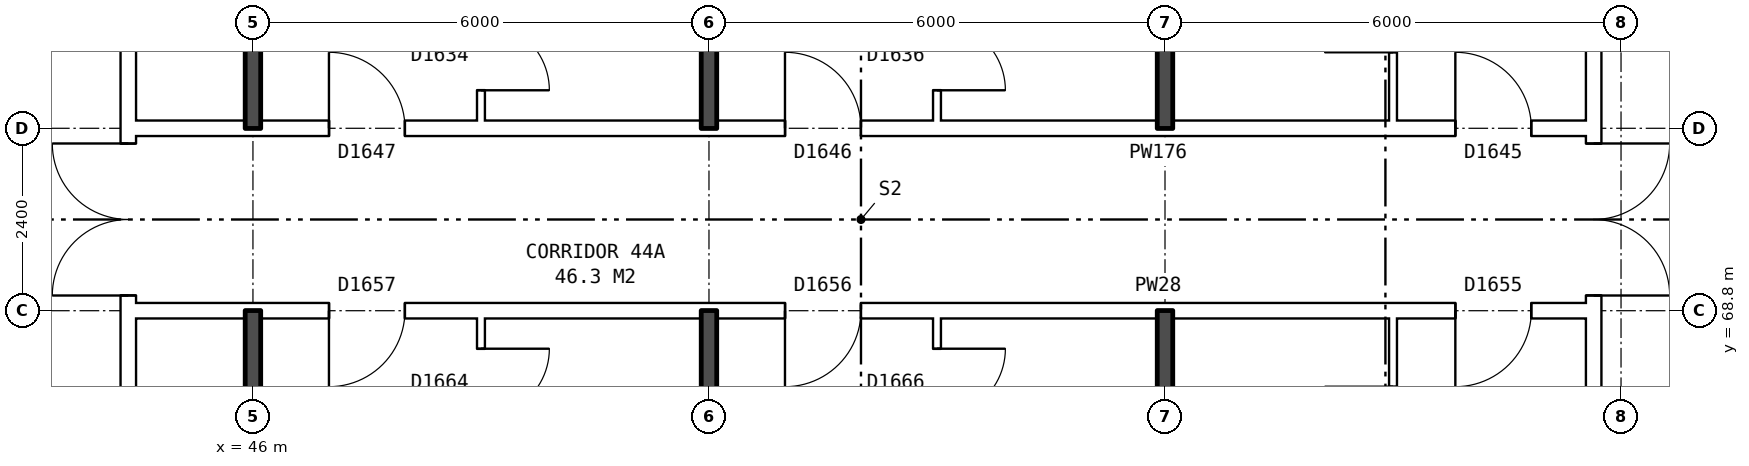
"""IFC4 building model, lengths in metres.
Left out: names, types, materials, properties, quantities, classifications, styles, units other than length and angle.
Written with IfcOpenShell. Run it as: python <this file> out.ifc"""

import sys

from ifc_helpers import new_model, si_unit, direction, frame, frame_2d, origin, place, context, subcontext, project, spatial, rectangle, extrude, element, fill, save


model = new_model("IFC4")
c1 = context("Model", 3, precision=1e-05, world=origin(), true_north=direction((0.0, 1.0)))
c2 = subcontext(c1, "Body", "Model", "MODEL_VIEW")
j1 = project(units=[si_unit("LENGTHUNIT", "METRE"), si_unit("PLANEANGLEUNIT", "RADIAN")], contexts=[c1])
p1 = place(None, origin())
s1 = spatial("IfcSite", under=j1, at=p1, CompositionType="ELEMENT")
p2 = place(p1, origin())
s2 = spatial("IfcBuilding", under=s1, at=p2, CompositionType="ELEMENT")
p3 = place(p2, frame((0.0, 0.0, 157.8)))
s3 = spatial("IfcBuildingStorey", under=s2, at=p3, CompositionType="ELEMENT", Elevation=157.8)
p4 = place(p3, frame((63.64, 63.9, 0.0), z_axis=(0.0, 0.0, 1.0), x_axis=(0.0, 1.0, 0.0)))
e1 = element("IfcWall", 1, at=p4, inside=s3, PredefinedType="PARTITIONING", context=c2, shape_type="SweptSolid", body=[
    extrude(rectangle(XDim=12.2, YDim=0.2, at=frame_2d((6.1, 0.0))), origin(), (0.0, 0.0, 1.0), 2.85),
])
p5 = place(p4, frame((5.1, 0.0, 0.0)))
e2 = element("IfcOpeningElement", 2, at=p5, cuts=e1, PredefinedType="OPENING", context=c2, shape_type="SweptSolid", body=[
    extrude(rectangle(XDim=2.0, YDim=2.1, at=frame_2d((1.0, 1.05))), frame((0.0, 0.11, 0.0), z_axis=(0.0, -1.0, 0.0), x_axis=(1.0, 0.0, 0.0)), (0.0, 0.0, 1.0), 0.22),
])
p6 = place(p3, frame((44.36, 63.9, 0.0), z_axis=(0.0, 0.0, 1.0), x_axis=(0.0, 1.0, 0.0)))
e3 = element("IfcWall", 3, at=p6, inside=s3, PredefinedType="PARTITIONING", context=c2, shape_type="SweptSolid", body=[
    extrude(rectangle(XDim=12.2, YDim=0.2, at=frame_2d((6.1, 0.0))), origin(), (0.0, 0.0, 1.0), 2.85),
])
p7 = place(p6, frame((5.1, 0.0, 0.0)))
e4 = element("IfcOpeningElement", 4, at=p7, cuts=e3, PredefinedType="OPENING", context=c2, shape_type="SweptSolid", body=[
    extrude(rectangle(XDim=2.0, YDim=2.1, at=frame_2d((1.0, 1.05))), frame((0.0, 0.11, 0.0), z_axis=(0.0, -1.0, 0.0), x_axis=(1.0, 0.0, 0.0)), (0.0, 0.0, 1.0), 0.22),
])
p8 = place(p3, frame((44.36, 68.8, 0.0), z_axis=(0.0, 0.0, 1.0), x_axis=(1.0, 0.0, 0.0)))
e5 = element("IfcWall", 5, at=p8, inside=s3, PredefinedType="PARTITIONING", context=c2, shape_type="SweptSolid", body=[
    extrude(rectangle(XDim=19.28, YDim=0.2, at=frame_2d((9.64, 0.0))), origin(), (0.0, 0.0, 1.0), 2.85),
])
p9 = place(p8, frame((17.46, 0.0, 0.0)))
e6 = element("IfcOpeningElement", 6, at=p9, cuts=e5, PredefinedType="OPENING", context=c2, shape_type="SweptSolid", body=[
    extrude(rectangle(XDim=1.0, YDim=2.1, at=frame_2d((0.5, 1.05))), frame((0.0, 0.11, 0.0), z_axis=(0.0, -1.0, 0.0), x_axis=(1.0, 0.0, 0.0)), (0.0, 0.0, 1.0), 0.22),
])
p10 = place(p8, frame((8.64, 0.0, 0.0)))
e7 = element("IfcOpeningElement", 7, at=p10, cuts=e5, PredefinedType="OPENING", context=c2, shape_type="SweptSolid", body=[
    extrude(rectangle(XDim=1.0, YDim=2.1, at=frame_2d((0.5, 1.05))), frame((0.0, 0.11, 0.0), z_axis=(0.0, -1.0, 0.0), x_axis=(1.0, 0.0, 0.0)), (0.0, 0.0, 1.0), 0.22),
])
p11 = place(p8, frame((2.64, 0.0, 0.0)))
e8 = element("IfcOpeningElement", 8, at=p11, cuts=e5, PredefinedType="OPENING", context=c2, shape_type="SweptSolid", body=[
    extrude(rectangle(XDim=1.0, YDim=2.1, at=frame_2d((0.5, 1.05))), frame((0.0, 0.11, 0.0), z_axis=(0.0, -1.0, 0.0), x_axis=(1.0, 0.0, 0.0)), (0.0, 0.0, 1.0), 0.22),
])
p12 = place(p3, frame((44.36, 71.2, 0.0), z_axis=(0.0, 0.0, 1.0), x_axis=(1.0, 0.0, 0.0)))
e9 = element("IfcWall", 9, at=p12, inside=s3, PredefinedType="PARTITIONING", context=c2, shape_type="SweptSolid", body=[
    extrude(rectangle(XDim=19.28, YDim=0.2, at=frame_2d((9.64, 0.0))), origin(), (0.0, 0.0, 1.0), 2.85),
])
p13 = place(p12, frame((17.46, 0.0, 0.0)))
e10 = element("IfcOpeningElement", 10, at=p13, cuts=e9, PredefinedType="OPENING", context=c2, shape_type="SweptSolid", body=[
    extrude(rectangle(XDim=1.0, YDim=2.1, at=frame_2d((0.5, 1.05))), frame((0.0, 0.11, 0.0), z_axis=(0.0, -1.0, 0.0), x_axis=(1.0, 0.0, 0.0)), (0.0, 0.0, 1.0), 0.22),
])
p14 = place(p12, frame((8.64, 0.0, 0.0)))
e11 = element("IfcOpeningElement", 11, at=p14, cuts=e9, PredefinedType="OPENING", context=c2, shape_type="SweptSolid", body=[
    extrude(rectangle(XDim=1.0, YDim=2.1, at=frame_2d((0.5, 1.05))), frame((0.0, 0.11, 0.0), z_axis=(0.0, -1.0, 0.0), x_axis=(1.0, 0.0, 0.0)), (0.0, 0.0, 1.0), 0.22),
])
p15 = place(p12, frame((2.64, 0.0, 0.0)))
e12 = element("IfcOpeningElement", 12, at=p15, cuts=e9, PredefinedType="OPENING", context=c2, shape_type="SweptSolid", body=[
    extrude(rectangle(XDim=1.0, YDim=2.1, at=frame_2d((0.5, 1.05))), frame((0.0, 0.11, 0.0), z_axis=(0.0, -1.0, 0.0), x_axis=(1.0, 0.0, 0.0)), (0.0, 0.0, 1.0), 0.22),
])
for number, where, z_axis, x_axis in (
    (13, (46.0, 63.8, 0.0), (0.0, 0.0, 1.0), (0.0, 1.0, 0.0)),
    (14, (46.0, 71.2, 0.0), (0.0, 0.0, 1.0), (0.0, 1.0, 0.0)),
):
    element("IfcWall", number, at=place(p3, frame(where, z_axis=z_axis, x_axis=x_axis)), inside=s3, PredefinedType="SOLIDWALL", context=c2, shape_type="SweptSolid", body=[
        extrude(rectangle(XDim=5.0, YDim=0.2, at=frame_2d((2.5, 0.0))), origin(), (0.0, 0.0, 1.0), 2.85),
    ])
p16 = place(p3, frame((49.0, 54.36, 0.0), z_axis=(0.0, 0.0, 1.0), x_axis=(0.0, 1.0, 0.0)))
e15 = element("IfcWall", 15, at=p16, inside=s3, PredefinedType="PARTITIONING", context=c2, shape_type="SweptSolid", body=[
    extrude(rectangle(XDim=14.34, YDim=0.1, at=frame_2d((7.17, 0.0))), origin(), (0.0, 0.0, 1.0), 2.85),
])
p17 = place(p16, frame((5.5, 0.0, 0.0)))
e16 = element("IfcOpeningElement", 16, at=p17, cuts=e15, PredefinedType="OPENING", context=c2, shape_type="SweptSolid", body=[
    extrude(rectangle(XDim=0.9, YDim=2.1, at=frame_2d((0.45, 1.05))), frame((0.0, 0.06, 0.0), z_axis=(0.0, -1.0, 0.0), x_axis=(1.0, 0.0, 0.0)), (0.0, 0.0, 1.0), 0.12),
])
p18 = place(p16, frame((13.04, 0.0, 0.0)))
e17 = element("IfcOpeningElement", 17, at=p18, cuts=e15, PredefinedType="OPENING", context=c2, shape_type="SweptSolid", body=[
    extrude(rectangle(XDim=0.9, YDim=2.1, at=frame_2d((0.45, 1.05))), frame((0.0, 0.06, 0.0), z_axis=(0.0, -1.0, 0.0), x_axis=(1.0, 0.0, 0.0)), (0.0, 0.0, 1.0), 0.12),
])
p19 = place(p3, frame((49.0, 71.3, 0.0), z_axis=(0.0, 0.0, 1.0), x_axis=(0.0, 1.0, 0.0)))
e18 = element("IfcWall", 18, at=p19, inside=s3, PredefinedType="PARTITIONING", context=c2, shape_type="SweptSolid", body=[
    extrude(rectangle(XDim=14.34, YDim=0.1, at=frame_2d((7.17, 0.0))), origin(), (0.0, 0.0, 1.0), 2.85),
])
p20 = place(p19, frame((7.94, 0.0, 0.0)))
e19 = element("IfcOpeningElement", 19, at=p20, cuts=e18, PredefinedType="OPENING", context=c2, shape_type="SweptSolid", body=[
    extrude(rectangle(XDim=0.9, YDim=2.1, at=frame_2d((0.45, 1.05))), frame((0.0, 0.06, 0.0), z_axis=(0.0, -1.0, 0.0), x_axis=(1.0, 0.0, 0.0)), (0.0, 0.0, 1.0), 0.12),
])
p21 = place(p19, frame((0.4, 0.0, 0.0)))
e20 = element("IfcOpeningElement", 20, at=p21, cuts=e18, PredefinedType="OPENING", context=c2, shape_type="SweptSolid", body=[
    extrude(rectangle(XDim=0.9, YDim=2.1, at=frame_2d((0.45, 1.05))), frame((0.0, 0.06, 0.0), z_axis=(0.0, -1.0, 0.0), x_axis=(1.0, 0.0, 0.0)), (0.0, 0.0, 1.0), 0.12),
])
for number, where, z_axis, x_axis in (
    (21, (52.0, 54.36, 0.0), (0.0, 0.0, 1.0), (0.0, 1.0, 0.0)),
    (22, (52.0, 71.2, 0.0), (0.0, 0.0, 1.0), (0.0, 1.0, 0.0)),
):
    element("IfcWall", number, at=place(p3, frame(where, z_axis=z_axis, x_axis=x_axis)), inside=s3, PredefinedType="SOLIDWALL", context=c2, shape_type="SweptSolid", body=[
        extrude(rectangle(XDim=14.44, YDim=0.2, at=frame_2d((7.22, 0.0))), origin(), (0.0, 0.0, 1.0), 2.85),
    ])
p22 = place(p3, frame((55.0, 54.36, 0.0), z_axis=(0.0, 0.0, 1.0), x_axis=(0.0, 1.0, 0.0)))
e23 = element("IfcWall", 23, at=p22, inside=s3, PredefinedType="PARTITIONING", context=c2, shape_type="SweptSolid", body=[
    extrude(rectangle(XDim=14.34, YDim=0.1, at=frame_2d((7.17, 0.0))), origin(), (0.0, 0.0, 1.0), 2.85),
])
p23 = place(p22, frame((5.5, 0.0, 0.0)))
e24 = element("IfcOpeningElement", 24, at=p23, cuts=e23, PredefinedType="OPENING", context=c2, shape_type="SweptSolid", body=[
    extrude(rectangle(XDim=0.9, YDim=2.1, at=frame_2d((0.45, 1.05))), frame((0.0, 0.06, 0.0), z_axis=(0.0, -1.0, 0.0), x_axis=(1.0, 0.0, 0.0)), (0.0, 0.0, 1.0), 0.12),
])
p24 = place(p22, frame((13.04, 0.0, 0.0)))
e25 = element("IfcOpeningElement", 25, at=p24, cuts=e23, PredefinedType="OPENING", context=c2, shape_type="SweptSolid", body=[
    extrude(rectangle(XDim=0.9, YDim=2.1, at=frame_2d((0.45, 1.05))), frame((0.0, 0.06, 0.0), z_axis=(0.0, -1.0, 0.0), x_axis=(1.0, 0.0, 0.0)), (0.0, 0.0, 1.0), 0.12),
])
p25 = place(p3, frame((55.0, 71.3, 0.0), z_axis=(0.0, 0.0, 1.0), x_axis=(0.0, 1.0, 0.0)))
e26 = element("IfcWall", 26, at=p25, inside=s3, PredefinedType="PARTITIONING", context=c2, shape_type="SweptSolid", body=[
    extrude(rectangle(XDim=14.34, YDim=0.1, at=frame_2d((7.17, 0.0))), origin(), (0.0, 0.0, 1.0), 2.85),
])
p26 = place(p25, frame((6.74, 0.0, 0.0)))
e27 = element("IfcOpeningElement", 27, at=p26, cuts=e26, PredefinedType="OPENING", context=c2, shape_type="SweptSolid", body=[
    extrude(rectangle(XDim=0.9, YDim=2.1, at=frame_2d((0.45, 1.05))), frame((0.0, 0.06, 0.0), z_axis=(0.0, -1.0, 0.0), x_axis=(1.0, 0.0, 0.0)), (0.0, 0.0, 1.0), 0.12),
])
p27 = place(p25, frame((0.4, 0.0, 0.0)))
e28 = element("IfcOpeningElement", 28, at=p27, cuts=e26, PredefinedType="OPENING", context=c2, shape_type="SweptSolid", body=[
    extrude(rectangle(XDim=0.9, YDim=2.1, at=frame_2d((0.45, 1.05))), frame((0.0, 0.06, 0.0), z_axis=(0.0, -1.0, 0.0), x_axis=(1.0, 0.0, 0.0)), (0.0, 0.0, 1.0), 0.12),
])
for number, where, z_axis, x_axis in (
    (29, (58.0, 54.36, 0.0), (0.0, 0.0, 1.0), (0.0, 1.0, 0.0)),
    (30, (58.0, 71.2, 0.0), (0.0, 0.0, 1.0), (0.0, 1.0, 0.0)),
):
    element("IfcWall", number, at=place(p3, frame(where, z_axis=z_axis, x_axis=x_axis)), inside=s3, PredefinedType="SOLIDWALL", context=c2, shape_type="SweptSolid", body=[
        extrude(rectangle(XDim=14.44, YDim=0.2, at=frame_2d((7.22, 0.0))), origin(), (0.0, 0.0, 1.0), 2.85),
    ])
p28 = place(p3, frame((61.0, 54.36, 0.0), z_axis=(0.0, 0.0, 1.0), x_axis=(0.0, 1.0, 0.0)))
e31 = element("IfcWall", 31, at=p28, inside=s3, PredefinedType="PARTITIONING", context=c2, shape_type="SweptSolid", body=[
    extrude(rectangle(XDim=14.34, YDim=0.1, at=frame_2d((7.17, 0.0))), origin(), (0.0, 0.0, 1.0), 2.85),
])
p29 = place(p28, frame((6.7, 0.0, 0.0)))
e32 = element("IfcOpeningElement", 32, at=p29, cuts=e31, PredefinedType="OPENING", context=c2, shape_type="SweptSolid", body=[
    extrude(rectangle(XDim=0.9, YDim=2.1, at=frame_2d((0.45, 1.05))), frame((0.0, 0.06, 0.0), z_axis=(0.0, -1.0, 0.0), x_axis=(1.0, 0.0, 0.0)), (0.0, 0.0, 1.0), 0.12),
])
p30 = place(p28, frame((12.54, 0.0, 0.0)))
e33 = element("IfcOpeningElement", 33, at=p30, cuts=e31, PredefinedType="OPENING", context=c2, shape_type="SweptSolid", body=[
    extrude(rectangle(XDim=0.9, YDim=2.1, at=frame_2d((0.45, 1.05))), frame((0.0, 0.06, 0.0), z_axis=(0.0, -1.0, 0.0), x_axis=(1.0, 0.0, 0.0)), (0.0, 0.0, 1.0), 0.12),
])
p31 = place(p3, frame((61.0, 71.3, 0.0), z_axis=(0.0, 0.0, 1.0), x_axis=(0.0, 1.0, 0.0)))
e34 = element("IfcWall", 34, at=p31, inside=s3, PredefinedType="PARTITIONING", context=c2, shape_type="SweptSolid", body=[
    extrude(rectangle(XDim=14.34, YDim=0.1, at=frame_2d((7.17, 0.0))), origin(), (0.0, 0.0, 1.0), 2.85),
])
p32 = place(p31, frame((7.94, 0.0, 0.0)))
e35 = element("IfcOpeningElement", 35, at=p32, cuts=e34, PredefinedType="OPENING", context=c2, shape_type="SweptSolid", body=[
    extrude(rectangle(XDim=0.9, YDim=2.1, at=frame_2d((0.45, 1.05))), frame((0.0, 0.06, 0.0), z_axis=(0.0, -1.0, 0.0), x_axis=(1.0, 0.0, 0.0)), (0.0, 0.0, 1.0), 0.12),
])
p33 = place(p31, frame((0.9, 0.0, 0.0)))
e36 = element("IfcOpeningElement", 36, at=p33, cuts=e34, PredefinedType="OPENING", context=c2, shape_type="SweptSolid", body=[
    extrude(rectangle(XDim=0.9, YDim=2.1, at=frame_2d((0.45, 1.05))), frame((0.0, 0.06, 0.0), z_axis=(0.0, -1.0, 0.0), x_axis=(1.0, 0.0, 0.0)), (0.0, 0.0, 1.0), 0.12),
])
p34 = place(p5, frame((2.0, 0.0, 0.0), z_axis=(0.0, 0.0, 1.0), x_axis=(-1.0, 0.0, 0.0)))
e37 = element("IfcDoor", 37, at=p34, inside=s3, OperationType="DOUBLE_DOOR_SINGLE_SWING", PredefinedType="DOOR", context=c2, shape_type="SweptSolid", body=[
    extrude(rectangle(XDim=2.0, YDim=2.1, at=frame_2d((1.0, 1.05))), frame((0.0, 0.025, 0.0), z_axis=(0.0, -1.0, 0.0), x_axis=(1.0, 0.0, 0.0)), (0.0, 0.0, 1.0), 0.05),
])
fill(e2, e37)
p35 = place(p7, origin())
e38 = element("IfcDoor", 38, at=p35, inside=s3, OperationType="DOUBLE_DOOR_SINGLE_SWING", PredefinedType="DOOR", context=c2, shape_type="SweptSolid", body=[
    extrude(rectangle(XDim=2.0, YDim=2.1, at=frame_2d((1.0, 1.05))), frame((0.0, 0.025, 0.0), z_axis=(0.0, -1.0, 0.0), x_axis=(1.0, 0.0, 0.0)), (0.0, 0.0, 1.0), 0.05),
])
fill(e4, e38)
p36 = place(p9, frame((1.0, 0.0, 0.0), z_axis=(0.0, 0.0, 1.0), x_axis=(-1.0, 0.0, 0.0)))
e39 = element("IfcDoor", 39, at=p36, inside=s3, OperationType="SINGLE_SWING_RIGHT", PredefinedType="DOOR", context=c2, shape_type="SweptSolid", body=[
    extrude(rectangle(XDim=1.0, YDim=2.1, at=frame_2d((0.5, 1.05))), frame((0.0, 0.025, 0.0), z_axis=(0.0, -1.0, 0.0), x_axis=(1.0, 0.0, 0.0)), (0.0, 0.0, 1.0), 0.05),
])
fill(e6, e39)
p37 = place(p10, frame((1.0, 0.0, 0.0), z_axis=(0.0, 0.0, 1.0), x_axis=(-1.0, 0.0, 0.0)))
e40 = element("IfcDoor", 40, at=p37, inside=s3, OperationType="SINGLE_SWING_RIGHT", PredefinedType="DOOR", context=c2, shape_type="SweptSolid", body=[
    extrude(rectangle(XDim=1.0, YDim=2.1, at=frame_2d((0.5, 1.05))), frame((0.0, 0.025, 0.0), z_axis=(0.0, -1.0, 0.0), x_axis=(1.0, 0.0, 0.0)), (0.0, 0.0, 1.0), 0.05),
])
fill(e7, e40)
p38 = place(p24, frame((0.9, 0.0, 0.0), z_axis=(0.0, 0.0, 1.0), x_axis=(-1.0, 0.0, 0.0)))
e41 = element("IfcDoor", 41, at=p38, inside=s3, OperationType="SINGLE_SWING_LEFT", PredefinedType="DOOR", context=c2, shape_type="SweptSolid", body=[
    extrude(rectangle(XDim=0.9, YDim=2.1, at=frame_2d((0.45, 1.05))), frame((0.0, 0.025, 0.0), z_axis=(0.0, -1.0, 0.0), x_axis=(1.0, 0.0, 0.0)), (0.0, 0.0, 1.0), 0.05),
])
fill(e25, e41)
p39 = place(p11, frame((1.0, 0.0, 0.0), z_axis=(0.0, 0.0, 1.0), x_axis=(-1.0, 0.0, 0.0)))
e42 = element("IfcDoor", 42, at=p39, inside=s3, OperationType="SINGLE_SWING_RIGHT", PredefinedType="DOOR", context=c2, shape_type="SweptSolid", body=[
    extrude(rectangle(XDim=1.0, YDim=2.1, at=frame_2d((0.5, 1.05))), frame((0.0, 0.025, 0.0), z_axis=(0.0, -1.0, 0.0), x_axis=(1.0, 0.0, 0.0)), (0.0, 0.0, 1.0), 0.05),
])
fill(e8, e42)
p40 = place(p18, frame((0.9, 0.0, 0.0), z_axis=(0.0, 0.0, 1.0), x_axis=(-1.0, 0.0, 0.0)))
e43 = element("IfcDoor", 43, at=p40, inside=s3, OperationType="SINGLE_SWING_LEFT", PredefinedType="DOOR", context=c2, shape_type="SweptSolid", body=[
    extrude(rectangle(XDim=0.9, YDim=2.1, at=frame_2d((0.45, 1.05))), frame((0.0, 0.025, 0.0), z_axis=(0.0, -1.0, 0.0), x_axis=(1.0, 0.0, 0.0)), (0.0, 0.0, 1.0), 0.05),
])
fill(e17, e43)
p41 = place(p13, origin())
e44 = element("IfcDoor", 44, at=p41, inside=s3, OperationType="SINGLE_SWING_LEFT", PredefinedType="DOOR", context=c2, shape_type="SweptSolid", body=[
    extrude(rectangle(XDim=1.0, YDim=2.1, at=frame_2d((0.5, 1.05))), frame((0.0, 0.025, 0.0), z_axis=(0.0, -1.0, 0.0), x_axis=(1.0, 0.0, 0.0)), (0.0, 0.0, 1.0), 0.05),
])
fill(e10, e44)
p42 = place(p14, origin())
e45 = element("IfcDoor", 45, at=p42, inside=s3, OperationType="SINGLE_SWING_LEFT", PredefinedType="DOOR", context=c2, shape_type="SweptSolid", body=[
    extrude(rectangle(XDim=1.0, YDim=2.1, at=frame_2d((0.5, 1.05))), frame((0.0, 0.025, 0.0), z_axis=(0.0, -1.0, 0.0), x_axis=(1.0, 0.0, 0.0)), (0.0, 0.0, 1.0), 0.05),
])
fill(e11, e45)
p43 = place(p27, frame((0.9, 0.0, 0.0), z_axis=(0.0, 0.0, 1.0), x_axis=(-1.0, 0.0, 0.0)))
e46 = element("IfcDoor", 46, at=p43, inside=s3, OperationType="SINGLE_SWING_RIGHT", PredefinedType="DOOR", context=c2, shape_type="SweptSolid", body=[
    extrude(rectangle(XDim=0.9, YDim=2.1, at=frame_2d((0.45, 1.05))), frame((0.0, 0.025, 0.0), z_axis=(0.0, -1.0, 0.0), x_axis=(1.0, 0.0, 0.0)), (0.0, 0.0, 1.0), 0.05),
])
fill(e28, e46)
p44 = place(p15, origin())
e47 = element("IfcDoor", 47, at=p44, inside=s3, OperationType="SINGLE_SWING_LEFT", PredefinedType="DOOR", context=c2, shape_type="SweptSolid", body=[
    extrude(rectangle(XDim=1.0, YDim=2.1, at=frame_2d((0.5, 1.05))), frame((0.0, 0.025, 0.0), z_axis=(0.0, -1.0, 0.0), x_axis=(1.0, 0.0, 0.0)), (0.0, 0.0, 1.0), 0.05),
])
fill(e12, e47)
p45 = place(p21, frame((0.9, 0.0, 0.0), z_axis=(0.0, 0.0, 1.0), x_axis=(-1.0, 0.0, 0.0)))
e48 = element("IfcDoor", 48, at=p45, inside=s3, OperationType="SINGLE_SWING_RIGHT", PredefinedType="DOOR", context=c2, shape_type="SweptSolid", body=[
    extrude(rectangle(XDim=0.9, YDim=2.1, at=frame_2d((0.45, 1.05))), frame((0.0, 0.025, 0.0), z_axis=(0.0, -1.0, 0.0), x_axis=(1.0, 0.0, 0.0)), (0.0, 0.0, 1.0), 0.05),
])
fill(e20, e48)
save(model, sys.argv[1])
